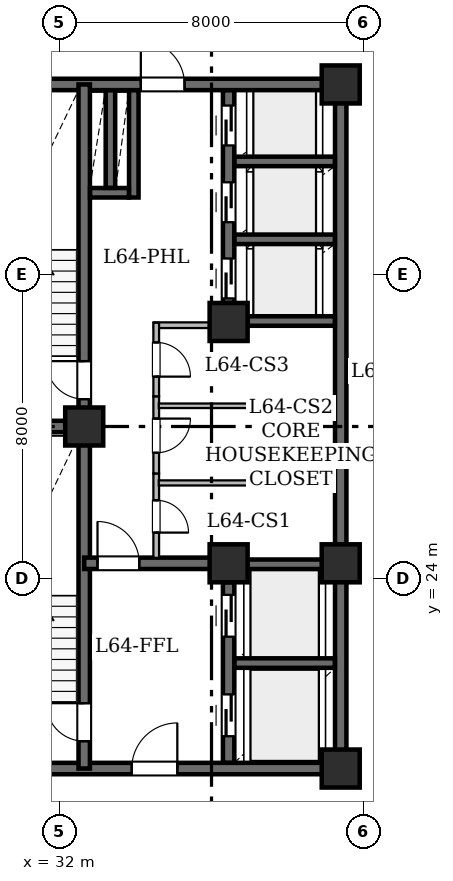
"""IFC4 building model, lengths in metres.
Left out: names, types, materials, properties, quantities, classifications, styles, units other than length and angle.
Written with IfcOpenShell. Run it as: python <this file> out.ifc"""

import sys

from ifc_helpers import new_model, si_unit, direction, frame, frame_2d, origin, origin_2d, place, context, subcontext, project, spatial, rectangle, hollow_rectangle, extrude, element, fill, save


model = new_model("IFC4")
c1 = context("Model", 3, precision=1e-05, world=origin(), true_north=direction((0.0, 1.0)))
c2 = subcontext(c1, "Body", "Model", "MODEL_VIEW")
j1 = project(units=[si_unit("LENGTHUNIT", "METRE"), si_unit("PLANEANGLEUNIT", "RADIAN")], contexts=[c1])
p1 = place(None, origin())
s1 = spatial("IfcSite", under=j1, at=p1, CompositionType="ELEMENT")
p2 = place(p1, origin())
s2 = spatial("IfcBuilding", under=s1, at=p2, CompositionType="ELEMENT")
p3 = place(p2, frame((0.0, 0.0, 250.05)))
s3 = spatial("IfcBuildingStorey", under=s2, at=p3, CompositionType="ELEMENT", Elevation=250.05)
for number, where, z_axis, x_axis in (
    (1, (32.65, 28.0, 0.0), (0.0, 0.0, 1.0), (1.0, 0.0, 0.0)),
    (2, (39.4, 19.0, 0.0), (0.0, 0.0, 1.0), (1.0, 0.0, 0.0)),
    (3, (36.45, 24.4, 0.0), (0.0, 0.0, 1.0), (1.0, 0.0, 0.0)),
    (4, (39.4, 24.4, 0.0), (0.0, 0.0, 1.0), (1.0, 0.0, 0.0)),
    (5, (36.45, 30.75, 0.0), (0.0, 0.0, 1.0), (1.0, 0.0, 0.0)),
    (6, (39.4, 37.0, 0.0), (0.0, 0.0, 1.0), (1.0, 0.0, 0.0)),
):
    element("IfcColumn", number, at=place(p3, frame(where, z_axis=z_axis, x_axis=x_axis)), inside=s3, PredefinedType="COLUMN", context=c2, shape_type="SweptSolid", body=[
        extrude(hollow_rectangle(XDim=1.0, YDim=1.0, WallThickness=0.05, at=origin_2d()), origin(), (0.0, 0.0, 1.0), 3.65),
    ])
p4 = place(p3, frame((29.0, 19.0, 0.0), z_axis=(0.0, 0.0, 1.0), x_axis=(1.0, 0.0, 0.0)))
e7 = element("IfcWall", 7, at=p4, inside=s3, PredefinedType="SHEAR", context=c2, shape_type="SweptSolid", body=[
    extrude(rectangle(XDim=10.4, YDim=0.3, at=frame_2d((5.2, 0.0))), origin(), (0.0, 0.0, 1.0), 3.43),
])
p5 = place(p4, frame((4.9, 0.0, 0.0)))
e8 = element("IfcOpeningElement", 8, at=p5, cuts=e7, PredefinedType="OPENING", context=c2, shape_type="SweptSolid", body=[
    extrude(rectangle(XDim=1.2, YDim=2.15, at=frame_2d((0.6, 1.075))), frame((0.0, 0.16, 0.0), z_axis=(0.0, -1.0, 0.0), x_axis=(1.0, 0.0, 0.0)), (0.0, 0.0, 1.0), 0.32),
])
p6 = place(p3, frame((29.0, 37.0, 0.0), z_axis=(0.0, 0.0, 1.0), x_axis=(1.0, 0.0, 0.0)))
e9 = element("IfcWall", 9, at=p6, inside=s3, PredefinedType="SHEAR", context=c2, shape_type="SweptSolid", body=[
    extrude(rectangle(XDim=10.4, YDim=0.3, at=frame_2d((5.2, 0.0))), origin(), (0.0, 0.0, 1.0), 3.43),
])
p7 = place(p6, frame((5.14, 0.0, 0.0)))
e10 = element("IfcOpeningElement", 10, at=p7, cuts=e9, PredefinedType="OPENING", context=c2, shape_type="SweptSolid", body=[
    extrude(rectangle(XDim=1.15, YDim=2.2, at=frame_2d((0.575, 1.1))), frame((0.0, 0.16, 0.0), z_axis=(0.0, -1.0, 0.0), x_axis=(1.0, 0.0, 0.0)), (0.0, 0.0, 1.0), 0.32),
])
p8 = place(p3, frame((39.4, 19.0, 0.0), z_axis=(0.0, 0.0, 1.0), x_axis=(0.0, 1.0, 0.0)))
e11 = element("IfcWall", 11, at=p8, inside=s3, PredefinedType="SHEAR", context=c2, shape_type="SweptSolid", body=[
    extrude(rectangle(XDim=5.4, YDim=0.3, at=frame_2d((2.7, 0.0))), origin(), (0.0, 0.0, 1.0), 3.43),
])
p9 = place(p3, frame((39.4, 24.4, 0.0), z_axis=(0.0, 0.0, 1.0), x_axis=(0.0, 1.0, 0.0)))
e12 = element("IfcWall", 12, at=p9, inside=s3, PredefinedType="SHEAR", context=c2, shape_type="SweptSolid", body=[
    extrude(rectangle(XDim=12.6, YDim=0.3, at=frame_2d((6.3, 0.0))), origin(), (0.0, 0.0, 1.0), 3.43),
])
p10 = place(p3, frame((32.65, 19.0, 0.0), z_axis=(0.0, 0.0, 1.0), x_axis=(0.0, 1.0, 0.0)))
e13 = element("IfcWall", 13, at=p10, inside=s3, PredefinedType="SHEAR", context=c2, shape_type="SweptSolid", body=[
    extrude(rectangle(XDim=9.0, YDim=0.3, at=frame_2d((4.5, 0.0))), origin(), (0.0, 0.0, 1.0), 3.43),
])
p11 = place(p10, frame((0.72, 0.0, 0.0)))
e14 = element("IfcOpeningElement", 14, at=p11, cuts=e13, PredefinedType="OPENING", context=c2, shape_type="SweptSolid", body=[
    extrude(rectangle(XDim=1.0, YDim=2.15, at=frame_2d((0.5, 1.075))), frame((0.0, 0.16, 0.0), z_axis=(0.0, -1.0, 0.0), x_axis=(1.0, 0.0, 0.0)), (0.0, 0.0, 1.0), 0.32),
])
p12 = place(p3, frame((32.65, 28.0, 0.0), z_axis=(0.0, 0.0, 1.0), x_axis=(0.0, 1.0, 0.0)))
e15 = element("IfcWall", 15, at=p12, inside=s3, PredefinedType="SHEAR", context=c2, shape_type="SweptSolid", body=[
    extrude(rectangle(XDim=9.0, YDim=0.3, at=frame_2d((4.5, 0.0))), origin(), (0.0, 0.0, 1.0), 3.43),
])
p13 = place(p12, frame((0.72, 0.0, 0.0)))
e16 = element("IfcOpeningElement", 16, at=p13, cuts=e15, PredefinedType="OPENING", context=c2, shape_type="SweptSolid", body=[
    extrude(rectangle(XDim=1.0, YDim=2.15, at=frame_2d((0.5, 1.075))), frame((0.0, 0.16, 0.0), z_axis=(0.0, -1.0, 0.0), x_axis=(1.0, 0.0, 0.0)), (0.0, 0.0, 1.0), 0.32),
])
p14 = place(p3, frame((29.0, 28.0, 0.0), z_axis=(0.0, 0.0, 1.0), x_axis=(1.0, 0.0, 0.0)))
e17 = element("IfcWall", 17, at=p14, inside=s3, PredefinedType="SHEAR", context=c2, shape_type="SweptSolid", body=[
    extrude(rectangle(XDim=3.65, YDim=0.3, at=frame_2d((1.825, 0.0))), origin(), (0.0, 0.0, 1.0), 3.43),
])
p15 = place(p3, frame((32.65, 24.4, 0.0), z_axis=(0.0, 0.0, 1.0), x_axis=(1.0, 0.0, 0.0)))
e18 = element("IfcWall", 18, at=p15, inside=s3, PredefinedType="SHEAR", context=c2, shape_type="SweptSolid", body=[
    extrude(rectangle(XDim=3.8, YDim=0.3, at=frame_2d((1.9, 0.0))), origin(), (0.0, 0.0, 1.0), 3.43),
])
p16 = place(p15, frame((0.35, 0.0, 0.0)))
e19 = element("IfcOpeningElement", 19, at=p16, cuts=e18, PredefinedType="OPENING", context=c2, shape_type="SweptSolid", body=[
    extrude(rectangle(XDim=1.1, YDim=2.15, at=frame_2d((0.55, 1.075))), frame((0.0, 0.16, 0.0), z_axis=(0.0, -1.0, 0.0), x_axis=(1.0, 0.0, 0.0)), (0.0, 0.0, 1.0), 0.32),
])
p17 = place(p3, frame((36.45, 19.154, 0.0), z_axis=(0.0, 0.0, 1.0), x_axis=(0.0, 1.0, 0.0)))
e20 = element("IfcWall", 20, at=p17, inside=s3, PredefinedType="SHEAR", context=c2, shape_type="SweptSolid", body=[
    extrude(rectangle(XDim=4.746, YDim=0.3, at=frame_2d((2.373, 0.0))), origin(), (0.0, 0.0, 1.0), 3.43),
])
p18 = place(p17, frame((0.696, 0.0, 0.0)))
e21 = element("IfcOpeningElement", 21, at=p18, cuts=e20, PredefinedType="OPENING", context=c2, shape_type="SweptSolid", body=[
    extrude(rectangle(XDim=1.1, YDim=2.15, at=frame_2d((0.55, 1.075))), frame((0.0, 0.16, 0.0), z_axis=(0.0, -1.0, 0.0), x_axis=(1.0, 0.0, 0.0)), (0.0, 0.0, 1.0), 0.32),
])
p19 = place(p17, frame((3.316, 0.0, 0.0)))
e22 = element("IfcOpeningElement", 22, at=p19, cuts=e20, PredefinedType="OPENING", context=c2, shape_type="SweptSolid", body=[
    extrude(rectangle(XDim=1.1, YDim=2.15, at=frame_2d((0.55, 1.075))), frame((0.0, 0.16, 0.0), z_axis=(0.0, -1.0, 0.0), x_axis=(1.0, 0.0, 0.0)), (0.0, 0.0, 1.0), 0.32),
])
p20 = place(p3, frame((36.45, 31.25, 0.0), z_axis=(0.0, 0.0, 1.0), x_axis=(0.0, 1.0, 0.0)))
e23 = element("IfcWall", 23, at=p20, inside=s3, PredefinedType="SHEAR", context=c2, shape_type="SweptSolid", body=[
    extrude(rectangle(XDim=5.596, YDim=0.3, at=frame_2d((2.798, 0.0))), origin(), (0.0, 0.0, 1.0), 3.43),
])
p21 = place(p20, frame((0.12, 0.0, 0.0)))
e24 = element("IfcOpeningElement", 24, at=p21, cuts=e23, PredefinedType="OPENING", context=c2, shape_type="SweptSolid", body=[
    extrude(rectangle(XDim=1.05, YDim=2.15, at=frame_2d((0.525, 1.075))), frame((0.0, 0.16, 0.0), z_axis=(0.0, -1.0, 0.0), x_axis=(1.0, 0.0, 0.0)), (0.0, 0.0, 1.0), 0.32),
])
p22 = place(p20, frame((2.125, 0.0, 0.0)))
e25 = element("IfcOpeningElement", 25, at=p22, cuts=e23, PredefinedType="OPENING", context=c2, shape_type="SweptSolid", body=[
    extrude(rectangle(XDim=1.05, YDim=2.15, at=frame_2d((0.525, 1.075))), frame((0.0, 0.16, 0.0), z_axis=(0.0, -1.0, 0.0), x_axis=(1.0, 0.0, 0.0)), (0.0, 0.0, 1.0), 0.32),
])
p23 = place(p20, frame((4.145, 0.0, 0.0)))
e26 = element("IfcOpeningElement", 26, at=p23, cuts=e23, PredefinedType="OPENING", context=c2, shape_type="SweptSolid", body=[
    extrude(rectangle(XDim=1.05, YDim=2.15, at=frame_2d((0.525, 1.075))), frame((0.0, 0.16, 0.0), z_axis=(0.0, -1.0, 0.0), x_axis=(1.0, 0.0, 0.0)), (0.0, 0.0, 1.0), 0.32),
])
for number, where, z_axis, x_axis in (
    (27, (36.604, 21.775, 0.0), (0.0, 0.0, 1.0), (1.0, 0.0, 0.0)),
    (28, (36.604, 24.375, 0.0), (0.0, 0.0, 1.0), (1.0, 0.0, 0.0)),
):
    element("IfcWall", number, at=place(p3, frame(where, z_axis=z_axis, x_axis=x_axis)), inside=s3, PredefinedType="SHEAR", context=c2, shape_type="SweptSolid", body=[
        extrude(rectangle(XDim=2.642, YDim=0.25, at=frame_2d((1.321, 0.0))), origin(), (0.0, 0.0, 1.0), 3.43),
    ])
p24 = place(p3, frame((36.954, 30.775, 0.0), z_axis=(0.0, 0.0, 1.0), x_axis=(1.0, 0.0, 0.0)))
e29 = element("IfcWall", 29, at=p24, inside=s3, PredefinedType="SHEAR", context=c2, shape_type="SweptSolid", body=[
    extrude(rectangle(XDim=2.292, YDim=0.25, at=frame_2d((1.146, 0.0))), origin(), (0.0, 0.0, 1.0), 3.43),
])
for number, where, z_axis, x_axis in (
    (30, (36.604, 32.925, 0.0), (0.0, 0.0, 1.0), (1.0, 0.0, 0.0)),
    (31, (36.604, 34.975, 0.0), (0.0, 0.0, 1.0), (1.0, 0.0, 0.0)),
):
    element("IfcWall", number, at=place(p3, frame(where, z_axis=z_axis, x_axis=x_axis)), inside=s3, PredefinedType="SHEAR", context=c2, shape_type="SweptSolid", body=[
        extrude(rectangle(XDim=2.642, YDim=0.25, at=frame_2d((1.321, 0.0))), origin(), (0.0, 0.0, 1.0), 3.43),
    ])
p25 = place(p3, frame((33.955, 34.025, 0.0), z_axis=(0.0, 0.0, 1.0), x_axis=(0.0, 1.0, 0.0)))
e32 = element("IfcWall", 32, at=p25, inside=s3, PredefinedType="SHEAR", context=c2, shape_type="SweptSolid", body=[
    extrude(rectangle(XDim=2.821, YDim=0.25, at=frame_2d((1.411, 0.0))), origin(), (0.0, 0.0, 1.0), 3.43),
])
p26 = place(p3, frame((32.804, 34.15, 0.0), z_axis=(0.0, 0.0, 1.0), x_axis=(1.0, 0.0, 0.0)))
e33 = element("IfcWall", 33, at=p26, inside=s3, PredefinedType="SHEAR", context=c2, shape_type="SweptSolid", body=[
    extrude(rectangle(XDim=1.022, YDim=0.25, at=frame_2d((0.511, 0.0))), origin(), (0.0, 0.0, 1.0), 3.43),
])
p27 = place(p3, frame((33.34, 34.279, 0.0), z_axis=(0.0, 0.0, 1.0), x_axis=(0.0, 1.0, 0.0)))
e34 = element("IfcWall", 34, at=p27, inside=s3, PredefinedType="SHEAR", context=c2, shape_type="SweptSolid", body=[
    extrude(rectangle(XDim=2.567, YDim=0.25, at=frame_2d((1.283, 0.0))), origin(), (0.0, 0.0, 1.0), 3.43),
])
p28 = place(p3, frame((34.545, 26.764, 0.0), z_axis=(0.0, 0.0, 1.0), x_axis=(0.0, -1.0, 0.0)))
e35 = element("IfcWall", 35, at=p28, inside=s3, PredefinedType="STANDARD", context=c2, shape_type="SweptSolid", body=[
    extrude(rectangle(XDim=2.22, YDim=0.15, at=frame_2d((1.11, 0.0))), origin(), (0.0, 0.0, 1.0), 3.43),
])
p29 = place(p28, frame((0.706, 0.0, 0.0)))
e36 = element("IfcOpeningElement", 36, at=p29, cuts=e35, PredefinedType="OPENING", context=c2, shape_type="SweptSolid", body=[
    extrude(rectangle(XDim=0.85, YDim=2.1, at=frame_2d((0.425, 1.05))), frame((0.0, 0.085, 0.0), z_axis=(0.0, -1.0, 0.0), x_axis=(1.0, 0.0, 0.0)), (0.0, 0.0, 1.0), 0.17),
])
p30 = place(p3, frame((34.545, 28.794, 0.0), z_axis=(0.0, 0.0, 1.0), x_axis=(0.0, -1.0, 0.0)))
e37 = element("IfcWall", 37, at=p30, inside=s3, PredefinedType="STANDARD", context=c2, shape_type="SweptSolid", body=[
    extrude(rectangle(XDim=2.03, YDim=0.15, at=frame_2d((1.015, 0.0))), origin(), (0.0, 0.0, 1.0), 3.43),
])
p31 = place(p30, frame((0.586, 0.0, 0.0)))
e38 = element("IfcOpeningElement", 38, at=p31, cuts=e37, PredefinedType="OPENING", context=c2, shape_type="SweptSolid", body=[
    extrude(rectangle(XDim=0.9, YDim=2.1, at=frame_2d((0.45, 1.05))), frame((0.0, 0.085, 0.0), z_axis=(0.0, -1.0, 0.0), x_axis=(1.0, 0.0, 0.0)), (0.0, 0.0, 1.0), 0.17),
])
p32 = place(p3, frame((36.3, 30.665, 0.0), z_axis=(0.0, 0.0, 1.0), x_axis=(-1.0, 0.0, 0.0)))
e39 = element("IfcWall", 39, at=p32, inside=s3, PredefinedType="STANDARD", context=c2, shape_type="SweptSolid", body=[
    extrude(rectangle(XDim=1.82, YDim=0.15, at=frame_2d((0.91, 0.0))), origin(), (0.0, 0.0, 1.0), 3.43),
])
p33 = place(p3, frame((34.545, 30.73, 0.0), z_axis=(0.0, 0.0, 1.0), x_axis=(0.0, -1.0, 0.0)))
e40 = element("IfcWall", 40, at=p33, inside=s3, PredefinedType="STANDARD", context=c2, shape_type="SweptSolid", body=[
    extrude(rectangle(XDim=1.936, YDim=0.15, at=frame_2d((0.968, 0.0))), origin(), (0.0, 0.0, 1.0), 3.43),
])
p34 = place(p33, frame((0.518, 0.0, 0.0)))
e41 = element("IfcOpeningElement", 41, at=p34, cuts=e40, PredefinedType="OPENING", context=c2, shape_type="SweptSolid", body=[
    extrude(rectangle(XDim=0.9, YDim=2.1, at=frame_2d((0.45, 1.05))), frame((0.0, 0.085, 0.0), z_axis=(0.0, -1.0, 0.0), x_axis=(1.0, 0.0, 0.0)), (0.0, 0.0, 1.0), 0.17),
])
p35 = place(p3, frame((34.612, 26.515, 0.0), z_axis=(0.0, 0.0, 1.0), x_axis=(1.0, 0.0, 0.0)))
e42 = element("IfcWall", 42, at=p35, inside=s3, PredefinedType="PARTITIONING", context=c2, shape_type="SweptSolid", body=[
    extrude(rectangle(XDim=4.644, YDim=0.135, at=frame_2d((2.322, 0.0))), origin(), (0.0, 0.0, 1.0), 3.43),
])
p36 = place(p3, frame((34.612, 28.545, 0.0), z_axis=(0.0, 0.0, 1.0), x_axis=(1.0, 0.0, 0.0)))
e43 = element("IfcWall", 43, at=p36, inside=s3, PredefinedType="PARTITIONING", context=c2, shape_type="SweptSolid", body=[
    extrude(rectangle(XDim=4.644, YDim=0.12, at=frame_2d((2.322, 0.0))), origin(), (0.0, 0.0, 1.0), 3.43),
])
p37 = place(p11, origin())
e44 = element("IfcDoor", 44, at=p37, inside=s3, OperationType="SINGLE_SWING_RIGHT", PredefinedType="DOOR", context=c2, shape_type="SweptSolid", body=[
    extrude(rectangle(XDim=1.0, YDim=2.15, at=frame_2d((0.5, 1.075))), frame((0.0, 0.025, 0.0), z_axis=(0.0, -1.0, 0.0), x_axis=(1.0, 0.0, 0.0)), (0.0, 0.0, 1.0), 0.05),
])
fill(e14, e44)
p38 = place(p13, origin())
e45 = element("IfcDoor", 45, at=p38, inside=s3, OperationType="SINGLE_SWING_RIGHT", PredefinedType="DOOR", context=c2, shape_type="SweptSolid", body=[
    extrude(rectangle(XDim=1.0, YDim=2.15, at=frame_2d((0.5, 1.075))), frame((0.0, 0.025, 0.0), z_axis=(0.0, -1.0, 0.0), x_axis=(1.0, 0.0, 0.0)), (0.0, 0.0, 1.0), 0.05),
])
fill(e16, e45)
p39 = place(p16, origin())
e46 = element("IfcDoor", 46, at=p39, inside=s3, OperationType="SINGLE_SWING_LEFT", PredefinedType="DOOR", context=c2, shape_type="SweptSolid", body=[
    extrude(rectangle(XDim=1.1, YDim=2.15, at=frame_2d((0.55, 1.075))), frame((0.0, 0.025, 0.0), z_axis=(0.0, -1.0, 0.0), x_axis=(1.0, 0.0, 0.0)), (0.0, 0.0, 1.0), 0.05),
])
fill(e19, e46)
p40 = place(p5, origin())
e47 = element("IfcDoor", 47, at=p40, inside=s3, OperationType="SINGLE_SWING_RIGHT", PredefinedType="DOOR", context=c2, shape_type="SweptSolid", body=[
    extrude(rectangle(XDim=1.2, YDim=2.15, at=frame_2d((0.6, 1.075))), frame((0.0, 0.025, 0.0), z_axis=(0.0, -1.0, 0.0), x_axis=(1.0, 0.0, 0.0)), (0.0, 0.0, 1.0), 0.05),
])
fill(e8, e47)
p41 = place(p7, origin())
e48 = element("IfcDoor", 48, at=p41, inside=s3, OperationType="SINGLE_SWING_LEFT", PredefinedType="DOOR", context=c2, shape_type="SweptSolid", body=[
    extrude(rectangle(XDim=1.15, YDim=2.2, at=frame_2d((0.575, 1.1))), frame((0.0, 0.025, 0.0), z_axis=(0.0, -1.0, 0.0), x_axis=(1.0, 0.0, 0.0)), (0.0, 0.0, 1.0), 0.05),
])
fill(e10, e48)
p42 = place(p18, origin())
e49 = element("IfcDoor", 49, at=p42, inside=s3, OperationType="SLIDING_TO_LEFT", PredefinedType="DOOR", context=c2, shape_type="SweptSolid", body=[
    extrude(rectangle(XDim=1.1, YDim=2.15, at=frame_2d((0.55, 1.075))), frame((0.0, 0.025, 0.0), z_axis=(0.0, -1.0, 0.0), x_axis=(1.0, 0.0, 0.0)), (0.0, 0.0, 1.0), 0.05),
])
fill(e21, e49)
p43 = place(p19, origin())
e50 = element("IfcDoor", 50, at=p43, inside=s3, OperationType="SLIDING_TO_LEFT", PredefinedType="DOOR", context=c2, shape_type="SweptSolid", body=[
    extrude(rectangle(XDim=1.1, YDim=2.15, at=frame_2d((0.55, 1.075))), frame((0.0, 0.025, 0.0), z_axis=(0.0, -1.0, 0.0), x_axis=(1.0, 0.0, 0.0)), (0.0, 0.0, 1.0), 0.05),
])
fill(e22, e50)
p44 = place(p21, origin())
e51 = element("IfcDoor", 51, at=p44, inside=s3, OperationType="SLIDING_TO_LEFT", PredefinedType="DOOR", context=c2, shape_type="SweptSolid", body=[
    extrude(rectangle(XDim=1.05, YDim=2.15, at=frame_2d((0.525, 1.075))), frame((0.0, 0.025, 0.0), z_axis=(0.0, -1.0, 0.0), x_axis=(1.0, 0.0, 0.0)), (0.0, 0.0, 1.0), 0.05),
])
fill(e24, e51)
p45 = place(p22, origin())
e52 = element("IfcDoor", 52, at=p45, inside=s3, OperationType="SLIDING_TO_LEFT", PredefinedType="DOOR", context=c2, shape_type="SweptSolid", body=[
    extrude(rectangle(XDim=1.05, YDim=2.15, at=frame_2d((0.525, 1.075))), frame((0.0, 0.025, 0.0), z_axis=(0.0, -1.0, 0.0), x_axis=(1.0, 0.0, 0.0)), (0.0, 0.0, 1.0), 0.05),
])
fill(e25, e52)
p46 = place(p23, origin())
e53 = element("IfcDoor", 53, at=p46, inside=s3, OperationType="SLIDING_TO_LEFT", PredefinedType="DOOR", context=c2, shape_type="SweptSolid", body=[
    extrude(rectangle(XDim=1.05, YDim=2.15, at=frame_2d((0.525, 1.075))), frame((0.0, 0.025, 0.0), z_axis=(0.0, -1.0, 0.0), x_axis=(1.0, 0.0, 0.0)), (0.0, 0.0, 1.0), 0.05),
])
fill(e26, e53)
p47 = place(p29, origin())
e54 = element("IfcDoor", 54, at=p47, inside=s3, OperationType="SINGLE_SWING_RIGHT", PredefinedType="DOOR", context=c2, shape_type="SweptSolid", body=[
    extrude(rectangle(XDim=0.85, YDim=2.1, at=frame_2d((0.425, 1.05))), frame((0.0, 0.025, 0.0), z_axis=(0.0, -1.0, 0.0), x_axis=(1.0, 0.0, 0.0)), (0.0, 0.0, 1.0), 0.05),
])
fill(e36, e54)
p48 = place(p31, origin())
e55 = element("IfcDoor", 55, at=p48, inside=s3, OperationType="SINGLE_SWING_LEFT", PredefinedType="DOOR", context=c2, shape_type="SweptSolid", body=[
    extrude(rectangle(XDim=0.9, YDim=2.1, at=frame_2d((0.45, 1.05))), frame((0.0, 0.025, 0.0), z_axis=(0.0, -1.0, 0.0), x_axis=(1.0, 0.0, 0.0)), (0.0, 0.0, 1.0), 0.05),
])
fill(e38, e55)
p49 = place(p34, origin())
e56 = element("IfcDoor", 56, at=p49, inside=s3, OperationType="SINGLE_SWING_RIGHT", PredefinedType="DOOR", context=c2, shape_type="SweptSolid", body=[
    extrude(rectangle(XDim=0.9, YDim=2.1, at=frame_2d((0.45, 1.05))), frame((0.0, 0.025, 0.0), z_axis=(0.0, -1.0, 0.0), x_axis=(1.0, 0.0, 0.0)), (0.0, 0.0, 1.0), 0.05),
])
fill(e41, e56)
save(model, sys.argv[1])
